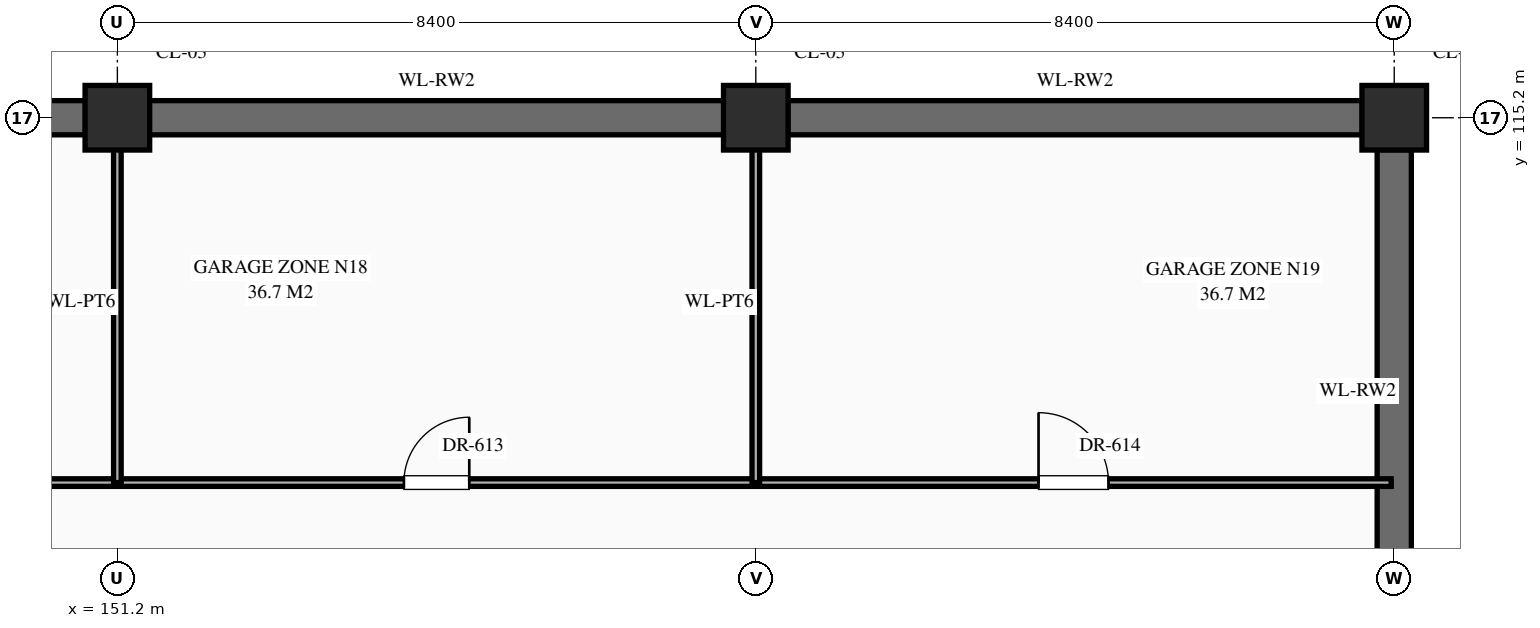
"""IFC4 building model, lengths in metres.
Left out: names, types, materials, properties, quantities, classifications, styles, units other than length and angle.
Written with IfcOpenShell. Run it as: python <this file> out.ifc"""

import sys

from ifc_helpers import new_model, si_unit, direction, frame, frame_2d, origin, origin_2d, place, context, subcontext, project, spatial, rectangle, extrude, element, fill, save


model = new_model("IFC4")
c1 = context("Model", 3, precision=1e-05, world=origin(), true_north=direction((0.0, 1.0)))
c2 = subcontext(c1, "Body", "Model", "MODEL_VIEW")
j1 = project(units=[si_unit("LENGTHUNIT", "METRE"), si_unit("PLANEANGLEUNIT", "RADIAN")], contexts=[c1])
p1 = place(None, origin())
s1 = spatial("IfcSite", under=j1, at=p1, CompositionType="ELEMENT")
p2 = place(p1, origin())
s2 = spatial("IfcBuilding", under=s1, at=p2, CompositionType="ELEMENT")
p3 = place(p2, frame((0.0, 0.0, -5.4)))
s3 = spatial("IfcBuildingStorey", under=s2, at=p3, CompositionType="ELEMENT", Elevation=-5.4)
for number, where, z_axis, x_axis in (
    (1, (151.2, 115.2, 0.0), (0.0, 0.0, 1.0), (1.0, 0.0, 0.0)),
    (2, (159.6, 115.2, 0.0), (0.0, 0.0, 1.0), (1.0, 0.0, 0.0)),
    (3, (168.0, 115.2, 0.0), (0.0, 0.0, 1.0), (1.0, 0.0, 0.0)),
):
    element("IfcColumn", number, at=place(p3, frame(where, z_axis=z_axis, x_axis=x_axis)), inside=s3, PredefinedType="COLUMN", context=c2, shape_type="SweptSolid", body=[
        extrude(rectangle(XDim=0.85, YDim=0.85, at=origin_2d()), origin(), (0.0, 0.0, 1.0), 5.4),
    ])
p4 = place(p3, frame((143.22, 115.2, 0.0), z_axis=(0.0, 0.0, 1.0), x_axis=(1.0, 0.0, 0.0)))
e4 = element("IfcWall", 4, at=p4, inside=s3, PredefinedType="USERDEFINED", context=c2, shape_type="SweptSolid", body=[
    extrude(rectangle(XDim=7.56, YDim=0.45, at=frame_2d((3.78, 0.0))), origin(), (0.0, 0.0, 1.0), 4.98),
])
p5 = place(p3, frame((151.62, 115.2, 0.0), z_axis=(0.0, 0.0, 1.0), x_axis=(1.0, 0.0, 0.0)))
e5 = element("IfcWall", 5, at=p5, inside=s3, PredefinedType="USERDEFINED", context=c2, shape_type="SweptSolid", body=[
    extrude(rectangle(XDim=7.56, YDim=0.45, at=frame_2d((3.78, 0.0))), origin(), (0.0, 0.0, 1.0), 4.98),
])
p6 = place(p3, frame((160.02, 115.2, 0.0), z_axis=(0.0, 0.0, 1.0), x_axis=(1.0, 0.0, 0.0)))
e6 = element("IfcWall", 6, at=p6, inside=s3, PredefinedType="USERDEFINED", context=c2, shape_type="SweptSolid", body=[
    extrude(rectangle(XDim=7.56, YDim=0.45, at=frame_2d((3.78, 0.0))), origin(), (0.0, 0.0, 1.0), 4.98),
])
p7 = place(p3, frame((168.0, 108.42, 0.0), z_axis=(0.0, 0.0, 1.0), x_axis=(0.0, 1.0, 0.0)))
e7 = element("IfcWall", 7, at=p7, inside=s3, PredefinedType="USERDEFINED", context=c2, shape_type="SweptSolid", body=[
    extrude(rectangle(XDim=6.36, YDim=0.45, at=frame_2d((3.18, 0.0))), origin(), (0.0, 0.0, 1.0), 4.98),
])
p8 = place(p3, frame((0.04, 110.4, 0.0), z_axis=(0.0, 0.0, 1.0), x_axis=(1.0, 0.0, 0.0)))
e8 = element("IfcWall", 8, at=p8, inside=s3, PredefinedType="STANDARD", context=c2, shape_type="SweptSolid", body=[
    extrude(rectangle(XDim=167.92, YDim=0.1, at=frame_2d((83.96, 0.0))), origin(), (0.0, 0.0, 1.0), 5.1),
])
p9 = place(p8, frame((3.65, 0.0, 0.0)))
e9 = element("IfcOpeningElement", 9, at=p9, cuts=e8, PredefinedType="OPENING", context=c2, shape_type="SweptSolid", body=[
    extrude(rectangle(XDim=1.06, YDim=2.4, at=frame_2d((0.53, 1.2))), frame((0.0, 0.062, 0.0), z_axis=(0.0, -1.0, 0.0), x_axis=(1.0, 0.0, 0.0)), (0.0, 0.0, 1.0), 0.124),
])
p10 = place(p8, frame((11.99, 0.0, 0.0)))
e10 = element("IfcOpeningElement", 10, at=p10, cuts=e8, PredefinedType="OPENING", context=c2, shape_type="SweptSolid", body=[
    extrude(rectangle(XDim=1.14, YDim=2.4, at=frame_2d((0.57, 1.2))), frame((0.0, 0.062, 0.0), z_axis=(0.0, -1.0, 0.0), x_axis=(1.0, 0.0, 0.0)), (0.0, 0.0, 1.0), 0.124),
])
p11 = place(p8, frame((20.51, 0.0, 0.0)))
e11 = element("IfcOpeningElement", 11, at=p11, cuts=e8, PredefinedType="OPENING", context=c2, shape_type="SweptSolid", body=[
    extrude(rectangle(XDim=0.9, YDim=2.15, at=frame_2d((0.45, 1.075))), frame((0.0, 0.062, 0.0), z_axis=(0.0, -1.0, 0.0), x_axis=(1.0, 0.0, 0.0)), (0.0, 0.0, 1.0), 0.124),
])
p12 = place(p8, frame((28.93, 0.0, 0.0)))
e12 = element("IfcOpeningElement", 12, at=p12, cuts=e8, PredefinedType="OPENING", context=c2, shape_type="SweptSolid", body=[
    extrude(rectangle(XDim=0.86, YDim=2.1, at=frame_2d((0.43, 1.05))), frame((0.0, 0.062, 0.0), z_axis=(0.0, -1.0, 0.0), x_axis=(1.0, 0.0, 0.0)), (0.0, 0.0, 1.0), 0.124),
])
p13 = place(p8, frame((37.3, 0.0, 0.0)))
e13 = element("IfcOpeningElement", 13, at=p13, cuts=e8, PredefinedType="OPENING", context=c2, shape_type="SweptSolid", body=[
    extrude(rectangle(XDim=0.92, YDim=2.15, at=frame_2d((0.46, 1.075))), frame((0.0, 0.062, 0.0), z_axis=(0.0, -1.0, 0.0), x_axis=(1.0, 0.0, 0.0)), (0.0, 0.0, 1.0), 0.124),
])
p14 = place(p8, frame((45.68, 0.0, 0.0)))
e14 = element("IfcOpeningElement", 14, at=p14, cuts=e8, PredefinedType="OPENING", context=c2, shape_type="SweptSolid", body=[
    extrude(rectangle(XDim=0.96, YDim=2.2, at=frame_2d((0.48, 1.1))), frame((0.0, 0.062, 0.0), z_axis=(0.0, -1.0, 0.0), x_axis=(1.0, 0.0, 0.0)), (0.0, 0.0, 1.0), 0.124),
])
p15 = place(p8, frame((54.04, 0.0, 0.0)))
e15 = element("IfcOpeningElement", 15, at=p15, cuts=e8, PredefinedType="OPENING", context=c2, shape_type="SweptSolid", body=[
    extrude(rectangle(XDim=1.04, YDim=2.2, at=frame_2d((0.52, 1.1))), frame((0.0, 0.062, 0.0), z_axis=(0.0, -1.0, 0.0), x_axis=(1.0, 0.0, 0.0)), (0.0, 0.0, 1.0), 0.124),
])
p16 = place(p8, frame((62.42, 0.0, 0.0)))
e16 = element("IfcOpeningElement", 16, at=p16, cuts=e8, PredefinedType="OPENING", context=c2, shape_type="SweptSolid", body=[
    extrude(rectangle(XDim=1.08, YDim=2.25, at=frame_2d((0.54, 1.125))), frame((0.0, 0.062, 0.0), z_axis=(0.0, -1.0, 0.0), x_axis=(1.0, 0.0, 0.0)), (0.0, 0.0, 1.0), 0.124),
])
p17 = place(p8, frame((70.8, 0.0, 0.0)))
e17 = element("IfcOpeningElement", 17, at=p17, cuts=e8, PredefinedType="OPENING", context=c2, shape_type="SweptSolid", body=[
    extrude(rectangle(XDim=1.12, YDim=2.25, at=frame_2d((0.56, 1.125))), frame((0.0, 0.062, 0.0), z_axis=(0.0, -1.0, 0.0), x_axis=(1.0, 0.0, 0.0)), (0.0, 0.0, 1.0), 0.124),
])
p18 = place(p8, frame((79.18, 0.0, 0.0)))
e18 = element("IfcOpeningElement", 18, at=p18, cuts=e8, PredefinedType="OPENING", context=c2, shape_type="SweptSolid", body=[
    extrude(rectangle(XDim=1.16, YDim=2.3, at=frame_2d((0.58, 1.15))), frame((0.0, 0.062, 0.0), z_axis=(0.0, -1.0, 0.0), x_axis=(1.0, 0.0, 0.0)), (0.0, 0.0, 1.0), 0.124),
])
p19 = place(p8, frame((87.54, 0.0, 0.0)))
e19 = element("IfcOpeningElement", 19, at=p19, cuts=e8, PredefinedType="OPENING", context=c2, shape_type="SweptSolid", body=[
    extrude(rectangle(XDim=1.24, YDim=2.3, at=frame_2d((0.62, 1.15))), frame((0.0, 0.062, 0.0), z_axis=(0.0, -1.0, 0.0), x_axis=(1.0, 0.0, 0.0)), (0.0, 0.0, 1.0), 0.124),
])
p20 = place(p8, frame((95.92, 0.0, 0.0)))
e20 = element("IfcOpeningElement", 20, at=p20, cuts=e8, PredefinedType="OPENING", context=c2, shape_type="SweptSolid", body=[
    extrude(rectangle(XDim=1.28, YDim=2.35, at=frame_2d((0.64, 1.175))), frame((0.0, 0.062, 0.0), z_axis=(0.0, -1.0, 0.0), x_axis=(1.0, 0.0, 0.0)), (0.0, 0.0, 1.0), 0.124),
])
p21 = place(p8, frame((104.49, 0.0, 0.0)))
e21 = element("IfcOpeningElement", 21, at=p21, cuts=e8, PredefinedType="OPENING", context=c2, shape_type="SweptSolid", body=[
    extrude(rectangle(XDim=0.94, YDim=2.3, at=frame_2d((0.47, 1.15))), frame((0.0, 0.062, 0.0), z_axis=(0.0, -1.0, 0.0), x_axis=(1.0, 0.0, 0.0)), (0.0, 0.0, 1.0), 0.124),
])
p22 = place(p8, frame((112.87, 0.0, 0.0)))
e22 = element("IfcOpeningElement", 22, at=p22, cuts=e8, PredefinedType="OPENING", context=c2, shape_type="SweptSolid", body=[
    extrude(rectangle(XDim=0.98, YDim=2.35, at=frame_2d((0.49, 1.175))), frame((0.0, 0.062, 0.0), z_axis=(0.0, -1.0, 0.0), x_axis=(1.0, 0.0, 0.0)), (0.0, 0.0, 1.0), 0.124),
])
p23 = place(p8, frame((121.25, 0.0, 0.0)))
e23 = element("IfcOpeningElement", 23, at=p23, cuts=e8, PredefinedType="OPENING", context=c2, shape_type="SweptSolid", body=[
    extrude(rectangle(XDim=1.02, YDim=2.4, at=frame_2d((0.51, 1.2))), frame((0.0, 0.062, 0.0), z_axis=(0.0, -1.0, 0.0), x_axis=(1.0, 0.0, 0.0)), (0.0, 0.0, 1.0), 0.124),
])
p24 = place(p8, frame((129.63, 0.0, 0.0)))
e24 = element("IfcOpeningElement", 24, at=p24, cuts=e8, PredefinedType="OPENING", context=c2, shape_type="SweptSolid", body=[
    extrude(rectangle(XDim=1.06, YDim=2.4, at=frame_2d((0.53, 1.2))), frame((0.0, 0.062, 0.0), z_axis=(0.0, -1.0, 0.0), x_axis=(1.0, 0.0, 0.0)), (0.0, 0.0, 1.0), 0.124),
])
p25 = place(p8, frame((137.99, 0.0, 0.0)))
e25 = element("IfcOpeningElement", 25, at=p25, cuts=e8, PredefinedType="OPENING", context=c2, shape_type="SweptSolid", body=[
    extrude(rectangle(XDim=1.14, YDim=2.4, at=frame_2d((0.57, 1.2))), frame((0.0, 0.062, 0.0), z_axis=(0.0, -1.0, 0.0), x_axis=(1.0, 0.0, 0.0)), (0.0, 0.0, 1.0), 0.124),
])
p26 = place(p8, frame((146.51, 0.0, 0.0)))
e26 = element("IfcOpeningElement", 26, at=p26, cuts=e8, PredefinedType="OPENING", context=c2, shape_type="SweptSolid", body=[
    extrude(rectangle(XDim=0.9, YDim=2.15, at=frame_2d((0.45, 1.075))), frame((0.0, 0.062, 0.0), z_axis=(0.0, -1.0, 0.0), x_axis=(1.0, 0.0, 0.0)), (0.0, 0.0, 1.0), 0.124),
])
p27 = place(p8, frame((154.93, 0.0, 0.0)))
e27 = element("IfcOpeningElement", 27, at=p27, cuts=e8, PredefinedType="OPENING", context=c2, shape_type="SweptSolid", body=[
    extrude(rectangle(XDim=0.86, YDim=2.1, at=frame_2d((0.43, 1.05))), frame((0.0, 0.062, 0.0), z_axis=(0.0, -1.0, 0.0), x_axis=(1.0, 0.0, 0.0)), (0.0, 0.0, 1.0), 0.124),
])
p28 = place(p8, frame((163.28, 0.0, 0.0)))
e28 = element("IfcOpeningElement", 28, at=p28, cuts=e8, PredefinedType="OPENING", context=c2, shape_type="SweptSolid", body=[
    extrude(rectangle(XDim=0.92, YDim=2.15, at=frame_2d((0.46, 1.075))), frame((0.0, 0.062, 0.0), z_axis=(0.0, -1.0, 0.0), x_axis=(1.0, 0.0, 0.0)), (0.0, 0.0, 1.0), 0.124),
])
for number, where, z_axis, x_axis in (
    (29, (151.2, 110.4, 0.0), (0.0, 0.0, 1.0), (0.0, 1.0, 0.0)),
    (30, (159.6, 110.4, 0.0), (0.0, 0.0, 1.0), (0.0, 1.0, 0.0)),
):
    element("IfcWall", number, at=place(p3, frame(where, z_axis=z_axis, x_axis=x_axis)), inside=s3, PredefinedType="STANDARD", context=c2, shape_type="SweptSolid", body=[
        extrude(rectangle(XDim=4.76, YDim=0.1, at=frame_2d((2.38, 0.0))), origin(), (0.0, 0.0, 1.0), 4.23),
    ])
p29 = place(p27, origin())
e31 = element("IfcDoor", 31, at=p29, inside=s3, OperationType="SINGLE_SWING_RIGHT", PredefinedType="DOOR", context=c2, shape_type="SweptSolid", body=[
    extrude(rectangle(XDim=0.86, YDim=2.1, at=frame_2d((0.43, 1.05))), frame((0.0, 0.025, 0.0), z_axis=(0.0, -1.0, 0.0), x_axis=(1.0, 0.0, 0.0)), (0.0, 0.0, 1.0), 0.05),
])
fill(e27, e31)
p30 = place(p28, origin())
e32 = element("IfcDoor", 32, at=p30, inside=s3, OperationType="SINGLE_SWING_LEFT", PredefinedType="DOOR", context=c2, shape_type="SweptSolid", body=[
    extrude(rectangle(XDim=0.92, YDim=2.15, at=frame_2d((0.46, 1.075))), frame((0.0, 0.025, 0.0), z_axis=(0.0, -1.0, 0.0), x_axis=(1.0, 0.0, 0.0)), (0.0, 0.0, 1.0), 0.05),
])
fill(e28, e32)
save(model, sys.argv[1])
